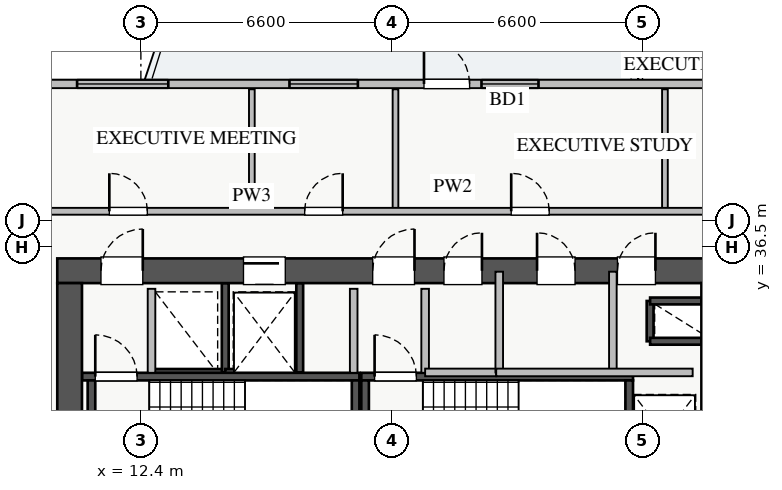
"""IFC4 building model, lengths in metres.
Left out: names, types, materials, properties, quantities, classifications, styles, units other than length and angle.
Written with IfcOpenShell. Run it as: python <this file> out.ifc"""

import sys

from ifc_helpers import new_model, si_unit, direction, frame, frame_2d, origin, place, context, subcontext, project, spatial, rectangle, extrude, source, transform, mapped, element, fill, save


model = new_model("IFC4")
c1 = context("Model", 3, precision=1e-05, world=origin(), true_north=direction((0.0, 1.0)))
c2 = subcontext(c1, "Body", "Model", "MODEL_VIEW")
j1 = project(units=[si_unit("LENGTHUNIT", "METRE"), si_unit("PLANEANGLEUNIT", "RADIAN")], contexts=[c1])
p1 = place(None, origin())
s1 = spatial("IfcSite", under=j1, at=p1, CompositionType="ELEMENT")
p2 = place(p1, origin())
s2 = spatial("IfcBuilding", under=s1, at=p2, CompositionType="ELEMENT")
p3 = place(p2, frame((0.0, 0.0, 97.0)))
s3 = spatial("IfcBuildingStorey", under=s2, at=p3, CompositionType="ELEMENT", Elevation=97.0)
p4 = place(p3, frame((12.68, 33.2, 0.0), z_axis=(0.0, 0.0, 1.0), x_axis=(1.0, 0.0, 0.0)))
e1 = element("IfcWall", 1, at=p4, inside=s3, PredefinedType="SHEAR", context=c2, shape_type="SweptSolid", body=[
    extrude(rectangle(XDim=1.94, YDim=0.18, at=frame_2d((0.97, 0.0))), origin(), (0.0, 0.0, 1.0), 3.07),
])
p5 = place(p3, frame((14.62, 33.2, 0.0), z_axis=(0.0, 0.0, 1.0), x_axis=(0.0, 1.0, 0.0)))
e2 = element("IfcWall", 2, at=p5, inside=s3, PredefinedType="SHEAR", context=c2, shape_type="SweptSolid", body=[
    extrude(rectangle(XDim=2.35, YDim=0.18, at=frame_2d((1.175, 0.0))), origin(), (0.0, 0.0, 1.0), 3.07),
])
p6 = place(p3, frame((25.8, 34.02, 0.0), z_axis=(0.0, 0.0, 1.0), x_axis=(0.0, 1.0, 0.0)))
e3 = element("IfcWall", 3, at=p6, inside=s3, PredefinedType="SHEAR", context=c2, shape_type="SweptSolid", body=[
    extrude(rectangle(XDim=1.06, YDim=0.18, at=frame_2d((0.53, 0.0))), origin(), (0.0, 0.0, 1.0), 3.07),
])
for number, where, z_axis, x_axis in (
    (4, (25.8, 35.08, 0.0), (0.0, 0.0, 1.0), (1.0, 0.0, 0.0)),
    (5, (25.8, 34.02, 0.0), (0.0, 0.0, 1.0), (1.0, 0.0, 0.0)),
):
    element("IfcWall", number, at=place(p3, frame(where, z_axis=z_axis, x_axis=x_axis)), inside=s3, PredefinedType="SHEAR", context=c2, shape_type="SweptSolid", body=[
        extrude(rectangle(XDim=1.35, YDim=0.18, at=frame_2d((0.675, 0.0))), origin(), (0.0, 0.0, 1.0), 3.07),
    ])
p7 = place(p3, frame((14.62, 33.2, 0.0), z_axis=(0.0, 0.0, 1.0), x_axis=(1.0, 0.0, 0.0)))
e6 = element("IfcWall", 6, at=p7, inside=s3, PredefinedType="SHEAR", context=c2, shape_type="SweptSolid", body=[
    extrude(rectangle(XDim=1.96, YDim=0.18, at=frame_2d((0.98, 0.0))), origin(), (0.0, 0.0, 1.0), 3.07),
])
p8 = place(p3, frame((16.58, 33.2, 0.0), z_axis=(0.0, 0.0, 1.0), x_axis=(0.0, 1.0, 0.0)))
e7 = element("IfcWall", 7, at=p8, inside=s3, PredefinedType="SHEAR", context=c2, shape_type="SweptSolid", body=[
    extrude(rectangle(XDim=2.35, YDim=0.18, at=frame_2d((1.175, 0.0))), origin(), (0.0, 0.0, 1.0), 3.07),
])
p9 = place(p3, frame((10.85, 33.09, 0.0), z_axis=(0.0, 0.0, 1.0), x_axis=(1.0, 0.0, 0.0)))
e8 = element("IfcWall", 8, at=p9, inside=s3, PredefinedType="SHEAR", context=c2, shape_type="SweptSolid", body=[
    extrude(rectangle(XDim=7.3, YDim=0.2, at=frame_2d((3.65, 0.0))), origin(), (0.0, 0.0, 1.0), 3.25),
])
p10 = place(p9, frame((0.35, 0.0, 0.0)))
e9 = element("IfcOpeningElement", 9, at=p10, cuts=e8, PredefinedType="OPENING", context=c2, shape_type="SweptSolid", body=[
    extrude(rectangle(XDim=1.1, YDim=2.05, at=frame_2d((0.55, 1.025))), frame((0.0, 0.11, 0.0), z_axis=(0.0, -1.0, 0.0), x_axis=(1.0, 0.0, 0.0)), (0.0, 0.0, 1.0), 0.22),
])
for number, where, z_axis, x_axis in (
    (10, (11.1, 30.05, 0.0), (0.0, 0.0, 1.0), (0.0, 1.0, 0.0)),
    (11, (18.05, 30.05, 0.0), (0.0, 0.0, 1.0), (0.0, 1.0, 0.0)),
):
    element("IfcWall", number, at=place(p3, frame(where, z_axis=z_axis, x_axis=x_axis)), inside=s3, PredefinedType="SHEAR", context=c2, shape_type="SweptSolid", body=[
        extrude(rectangle(XDim=2.94, YDim=0.2, at=frame_2d((1.47, 0.0))), origin(), (0.0, 0.0, 1.0), 3.25),
    ])
p11 = place(p3, frame((18.2, 33.09, 0.0), z_axis=(0.0, 0.0, 1.0), x_axis=(1.0, 0.0, 0.0)))
e12 = element("IfcWall", 12, at=p11, inside=s3, PredefinedType="SHEAR", context=c2, shape_type="SweptSolid", body=[
    extrude(rectangle(XDim=7.15, YDim=0.2, at=frame_2d((3.575, 0.0))), origin(), (0.0, 0.0, 1.0), 3.25),
])
p12 = place(p11, frame((0.35, 0.0, 0.0)))
e13 = element("IfcOpeningElement", 13, at=p12, cuts=e12, PredefinedType="OPENING", context=c2, shape_type="SweptSolid", body=[
    extrude(rectangle(XDim=1.1, YDim=2.05, at=frame_2d((0.55, 1.025))), frame((0.0, 0.11, 0.0), z_axis=(0.0, -1.0, 0.0), x_axis=(1.0, 0.0, 0.0)), (0.0, 0.0, 1.0), 0.22),
])
for number, where, z_axis, x_axis in (
    (14, (18.3, 30.05, 0.0), (0.0, 0.0, 1.0), (0.0, 1.0, 0.0)),
    (15, (25.25, 30.05, 0.0), (0.0, 0.0, 1.0), (0.0, 1.0, 0.0)),
):
    element("IfcWall", number, at=place(p3, frame(where, z_axis=z_axis, x_axis=x_axis)), inside=s3, PredefinedType="SHEAR", context=c2, shape_type="SweptSolid", body=[
        extrude(rectangle(XDim=2.94, YDim=0.2, at=frame_2d((1.47, 0.0))), origin(), (0.0, 0.0, 1.0), 3.25),
    ])
p13 = place(p3, frame((10.2, 35.875, 0.0), z_axis=(0.0, 0.0, 1.0), x_axis=(1.0, 0.0, 0.0)))
e16 = element("IfcWall", 16, at=p13, inside=s3, PredefinedType="SHEAR", context=c2, shape_type="SweptSolid", body=[
    extrude(rectangle(XDim=17.6, YDim=0.65, at=frame_2d((8.8, 0.0))), origin(), (0.0, 0.0, 1.0), 3.25),
])
p14 = place(p13, frame((1.15, 0.0, 0.0)))
e17 = element("IfcOpeningElement", 17, at=p14, cuts=e16, PredefinedType="OPENING", context=c2, shape_type="SweptSolid", body=[
    extrude(rectangle(XDim=1.1, YDim=2.05, at=frame_2d((0.55, 1.025))), frame((0.0, 0.335, 0.0), z_axis=(0.0, -1.0, 0.0), x_axis=(1.0, 0.0, 0.0)), (0.0, 0.0, 1.0), 0.67),
])
p15 = place(p13, frame((8.3, 0.0, 0.0)))
e18 = element("IfcOpeningElement", 18, at=p15, cuts=e16, PredefinedType="OPENING", context=c2, shape_type="SweptSolid", body=[
    extrude(rectangle(XDim=1.1, YDim=2.05, at=frame_2d((0.55, 1.025))), frame((0.0, 0.335, 0.0), z_axis=(0.0, -1.0, 0.0), x_axis=(1.0, 0.0, 0.0)), (0.0, 0.0, 1.0), 0.67),
])
p16 = place(p13, frame((4.9, 0.0, 0.0)))
e19 = element("IfcOpeningElement", 19, at=p16, cuts=e16, PredefinedType="OPENING", context=c2, shape_type="SweptSolid", body=[
    extrude(rectangle(XDim=1.1, YDim=2.05, at=frame_2d((0.55, 1.025))), frame((0.0, 0.335, 0.0), z_axis=(0.0, -1.0, 0.0), x_axis=(1.0, 0.0, 0.0)), (0.0, 0.0, 1.0), 0.67),
])
p17 = place(p13, frame((14.74, 0.0, 0.0)))
e20 = element("IfcOpeningElement", 20, at=p17, cuts=e16, PredefinedType="OPENING", context=c2, shape_type="SweptSolid", body=[
    extrude(rectangle(XDim=1.0, YDim=2.05, at=frame_2d((0.5, 1.025))), frame((0.0, 0.335, 0.0), z_axis=(0.0, -1.0, 0.0), x_axis=(1.0, 0.0, 0.0)), (0.0, 0.0, 1.0), 0.67),
])
p18 = place(p13, frame((10.175, 0.0, 0.0)))
e21 = element("IfcOpeningElement", 21, at=p18, cuts=e16, PredefinedType="OPENING", context=c2, shape_type="SweptSolid", body=[
    extrude(rectangle(XDim=1.0, YDim=2.05, at=frame_2d((0.5, 1.025))), frame((0.0, 0.335, 0.0), z_axis=(0.0, -1.0, 0.0), x_axis=(1.0, 0.0, 0.0)), (0.0, 0.0, 1.0), 0.67),
])
p19 = place(p13, frame((12.625, 0.0, 0.0)))
e22 = element("IfcOpeningElement", 22, at=p19, cuts=e16, PredefinedType="OPENING", context=c2, shape_type="SweptSolid", body=[
    extrude(rectangle(XDim=1.0, YDim=2.05, at=frame_2d((0.5, 1.025))), frame((0.0, 0.335, 0.0), z_axis=(0.0, -1.0, 0.0), x_axis=(1.0, 0.0, 0.0)), (0.0, 0.0, 1.0), 0.67),
])
p20 = place(p3, frame((10.525, 29.65, 0.0), z_axis=(0.0, 0.0, 1.0), x_axis=(0.0, 1.0, 0.0)))
e23 = element("IfcWall", 23, at=p20, inside=s3, PredefinedType="SHEAR", context=c2, shape_type="SweptSolid", body=[
    extrude(rectangle(XDim=5.9, YDim=0.65, at=frame_2d((2.95, 0.0))), origin(), (0.0, 0.0, 1.0), 3.25),
])
p21 = place(p3, frame((27.475, 29.65, 0.0), z_axis=(0.0, 0.0, 1.0), x_axis=(0.0, 1.0, 0.0)))
e24 = element("IfcWall", 24, at=p21, inside=s3, PredefinedType="SHEAR", context=c2, shape_type="SweptSolid", body=[
    extrude(rectangle(XDim=5.9, YDim=0.65, at=frame_2d((2.95, 0.0))), origin(), (0.0, 0.0, 1.0), 3.25),
])
p22 = place(p21, frame((1.1, 0.0, 0.0)))
e25 = element("IfcOpeningElement", 25, at=p22, cuts=e24, PredefinedType="OPENING", context=c2, shape_type="SweptSolid", body=[
    extrude(rectangle(XDim=1.3, YDim=2.05, at=frame_2d((0.65, 1.025))), frame((0.0, 0.335, 0.0), z_axis=(0.0, -1.0, 0.0), x_axis=(1.0, 0.0, 0.0)), (0.0, 0.0, 1.0), 0.67),
])
p23 = place(p3, frame((6.55, 40.79, 0.0), z_axis=(0.0, 0.0, 1.0), x_axis=(1.0, 0.0, 0.0)))
e26 = element("IfcWall", 26, at=p23, inside=s3, PredefinedType="STANDARD", context=c2, shape_type="SweptSolid", body=[
    extrude(rectangle(XDim=24.9, YDim=0.22, at=frame_2d((12.45, 0.0))), origin(), (0.0, 0.0, 1.0), 2.61),
])
p24 = place(p23, frame((13.3, 0.0, 0.0)))
e27 = element("IfcOpeningElement", 27, at=p24, cuts=e26, PredefinedType="OPENING", context=c2, shape_type="SweptSolid", body=[
    extrude(rectangle(XDim=1.2, YDim=2.1, at=frame_2d((0.6, 1.05))), frame((0.0, 0.12, 0.0), z_axis=(0.0, -1.0, 0.0), x_axis=(1.0, 0.0, 0.0)), (0.0, 0.0, 1.0), 0.24),
])
p25 = place(p23, frame((0.393, 0.0, 0.9)))
e28 = element("IfcOpeningElement", 28, at=p25, cuts=e26, PredefinedType="OPENING", context=c2, shape_type="SweptSolid", body=[
    extrude(rectangle(XDim=1.5, YDim=1.5, at=frame_2d((0.75, 0.75))), frame((0.0, 0.12, 0.0), z_axis=(0.0, -1.0, 0.0), x_axis=(1.0, 0.0, 0.0)), (0.0, 0.0, 1.0), 0.24),
])
p26 = place(p23, frame((9.76, 0.0, 0.9)))
e29 = element("IfcOpeningElement", 29, at=p26, cuts=e26, PredefinedType="OPENING", context=c2, shape_type="SweptSolid", body=[
    extrude(rectangle(XDim=1.8, YDim=1.5, at=frame_2d((0.9, 0.75))), frame((0.0, 0.12, 0.0), z_axis=(0.0, -1.0, 0.0), x_axis=(1.0, 0.0, 0.0)), (0.0, 0.0, 1.0), 0.24),
])
p27 = place(p23, frame((14.813, 0.0, 0.9)))
e30 = element("IfcOpeningElement", 30, at=p27, cuts=e26, PredefinedType="OPENING", context=c2, shape_type="SweptSolid", body=[
    extrude(rectangle(XDim=1.5, YDim=1.45, at=frame_2d((0.75, 0.725))), frame((0.0, 0.12, 0.0), z_axis=(0.0, -1.0, 0.0), x_axis=(1.0, 0.0, 0.0)), (0.0, 0.0, 1.0), 0.24),
])
p28 = place(p23, frame((20.738, 0.0, 0.9)))
e31 = element("IfcOpeningElement", 31, at=p28, cuts=e26, PredefinedType="OPENING", context=c2, shape_type="SweptSolid", body=[
    extrude(rectangle(XDim=2.1, YDim=1.48, at=frame_2d((1.05, 0.74))), frame((0.0, 0.12, 0.0), z_axis=(0.0, -1.0, 0.0), x_axis=(1.0, 0.0, 0.0)), (0.0, 0.0, 1.0), 0.24),
])
p29 = place(p23, frame((4.171, 0.0, 0.9)))
e32 = element("IfcOpeningElement", 32, at=p29, cuts=e26, PredefinedType="OPENING", context=c2, shape_type="SweptSolid", body=[
    extrude(rectangle(XDim=2.4, YDim=1.5, at=frame_2d((1.2, 0.75))), frame((0.0, 0.12, 0.0), z_axis=(0.0, -1.0, 0.0), x_axis=(1.0, 0.0, 0.0)), (0.0, 0.0, 1.0), 0.24),
])
for number, where, z_axis, x_axis in (
    (33, (12.68, 33.19, 0.0), (0.0, 0.0, 1.0), (0.0, 1.0, 0.0)),
    (34, (18.0, 33.19, 0.0), (0.0, 0.0, 1.0), (0.0, 1.0, 0.0)),
    (35, (19.88, 33.19, 0.0), (0.0, 0.0, 1.0), (0.0, 1.0, 0.0)),
):
    element("IfcWall", number, at=place(p3, frame(where, z_axis=z_axis, x_axis=x_axis)), inside=s3, PredefinedType="PARTITIONING", context=c2, shape_type="SweptSolid", body=[
        extrude(rectangle(XDim=2.21, YDim=0.2, at=frame_2d((1.105, 0.0))), origin(), (0.0, 0.0, 1.0), 3.07),
    ])
p30 = place(p3, frame((24.82, 33.2, 0.0), z_axis=(0.0, 0.0, 1.0), x_axis=(0.0, 1.0, 0.0)))
e36 = element("IfcWall", 36, at=p30, inside=s3, PredefinedType="PARTITIONING", context=c2, shape_type="SweptSolid", body=[
    extrude(rectangle(XDim=2.65, YDim=0.2, at=frame_2d((1.325, 0.0))), origin(), (0.0, 0.0, 1.0), 3.07),
])
p31 = place(p3, frame((19.88, 33.2, 0.0), z_axis=(0.0, 0.0, 1.0), x_axis=(1.0, 0.0, 0.0)))
e37 = element("IfcWall", 37, at=p31, inside=s3, PredefinedType="PARTITIONING", context=c2, shape_type="SweptSolid", body=[
    extrude(rectangle(XDim=1.87, YDim=0.2, at=frame_2d((0.935, 0.0))), origin(), (0.0, 0.0, 1.0), 3.07),
])
p32 = place(p3, frame((21.83, 33.2, 0.0), z_axis=(0.0, 0.0, 1.0), x_axis=(0.0, 1.0, 0.0)))
e38 = element("IfcWall", 38, at=p32, inside=s3, PredefinedType="PARTITIONING", context=c2, shape_type="SweptSolid", body=[
    extrude(rectangle(XDim=2.65, YDim=0.2, at=frame_2d((1.325, 0.0))), origin(), (0.0, 0.0, 1.0), 3.07),
])
p33 = place(p3, frame((21.75, 33.2, 0.0), z_axis=(0.0, 0.0, 1.0), x_axis=(1.0, 0.0, 0.0)))
e39 = element("IfcWall", 39, at=p33, inside=s3, PredefinedType="PARTITIONING", context=c2, shape_type="SweptSolid", body=[
    extrude(rectangle(XDim=5.17, YDim=0.2, at=frame_2d((2.585, 0.0))), origin(), (0.0, 0.0, 1.0), 3.07),
])
p34 = place(p3, frame((15.32, 37.44, 0.0), z_axis=(0.0, 0.0, 1.0), x_axis=(0.0, 1.0, 0.0)))
e40 = element("IfcWall", 40, at=p34, inside=s3, PredefinedType="PARTITIONING", context=c2, shape_type="SweptSolid", body=[
    extrude(rectangle(XDim=3.21, YDim=0.15, at=frame_2d((1.605, 0.0))), origin(), (0.0, 0.0, 1.0), 3.07),
])
p35 = place(p3, frame((19.1, 37.44, 0.0), z_axis=(0.0, 0.0, 1.0), x_axis=(0.0, 1.0, 0.0)))
e41 = element("IfcWall", 41, at=p35, inside=s3, PredefinedType="PARTITIONING", context=c2, shape_type="SweptSolid", body=[
    extrude(rectangle(XDim=3.21, YDim=0.15, at=frame_2d((1.605, 0.0))), origin(), (0.0, 0.0, 1.0), 2.815),
])
p36 = place(p3, frame((26.19, 37.44, 0.0), z_axis=(0.0, 0.0, 1.0), x_axis=(0.0, 1.0, 0.0)))
e42 = element("IfcWall", 42, at=p36, inside=s3, PredefinedType="PARTITIONING", context=c2, shape_type="SweptSolid", body=[
    extrude(rectangle(XDim=3.21, YDim=0.15, at=frame_2d((1.605, 0.0))), origin(), (0.0, 0.0, 1.0), 3.07),
])
p37 = place(p3, frame((8.82, 37.44, 0.0), z_axis=(0.0, 0.0, 1.0), x_axis=(1.0, 0.0, 0.0)))
e43 = element("IfcWall", 43, at=p37, inside=s3, PredefinedType="PARTITIONING", context=c2, shape_type="SweptSolid", body=[
    extrude(rectangle(XDim=23.58, YDim=0.18, at=frame_2d((11.79, 0.0))), origin(), (0.0, 0.0, 1.0), 3.07),
])
p38 = place(p37, frame((2.75, 0.0, 0.0)))
e44 = element("IfcOpeningElement", 44, at=p38, cuts=e43, PredefinedType="OPENING", context=c2, shape_type="SweptSolid", body=[
    extrude(rectangle(XDim=1.0, YDim=2.05, at=frame_2d((0.5, 1.025))), frame((0.0, 0.1, 0.0), z_axis=(0.0, -1.0, 0.0), x_axis=(1.0, 0.0, 0.0)), (0.0, 0.0, 1.0), 0.2),
])
p39 = place(p37, frame((7.89, 0.0, 0.0)))
e45 = element("IfcOpeningElement", 45, at=p39, cuts=e43, PredefinedType="OPENING", context=c2, shape_type="SweptSolid", body=[
    extrude(rectangle(XDim=1.0, YDim=2.05, at=frame_2d((0.5, 1.025))), frame((0.0, 0.1, 0.0), z_axis=(0.0, -1.0, 0.0), x_axis=(1.0, 0.0, 0.0)), (0.0, 0.0, 1.0), 0.2),
])
p40 = place(p37, frame((13.325, 0.0, 0.0)))
e46 = element("IfcOpeningElement", 46, at=p40, cuts=e43, PredefinedType="OPENING", context=c2, shape_type="SweptSolid", body=[
    extrude(rectangle(XDim=1.0, YDim=2.05, at=frame_2d((0.5, 1.025))), frame((0.0, 0.1, 0.0), z_axis=(0.0, -1.0, 0.0), x_axis=(1.0, 0.0, 0.0)), (0.0, 0.0, 1.0), 0.2),
])
p41 = place(p37, frame((19.765, 0.0, 0.0)))
e47 = element("IfcOpeningElement", 47, at=p41, cuts=e43, PredefinedType="OPENING", context=c2, shape_type="SweptSolid", body=[
    extrude(rectangle(XDim=1.0, YDim=2.05, at=frame_2d((0.5, 1.025))), frame((0.0, 0.1, 0.0), z_axis=(0.0, -1.0, 0.0), x_axis=(1.0, 0.0, 0.0)), (0.0, 0.0, 1.0), 0.2),
])
m1 = source(origin(), c2, "Body", "SweptSolid", [
    extrude(rectangle(XDim=1.2, YDim=2.1, at=frame_2d((0.6, 1.05))), frame((0.0, 0.025, 0.0), z_axis=(0.0, -1.0, 0.0), x_axis=(1.0, 0.0, 0.0)), (0.0, 0.0, 1.0), 0.05),
])
p42 = place(p24, origin())
e48 = element("IfcDoor", 48, at=p42, inside=s3, OperationType="SINGLE_SWING_LEFT", PredefinedType="DOOR", context=c2, shape_type="MappedRepresentation", body=[
    mapped(m1, transform((0.0, 0.0, 0.0), x_axis=(1.0, 0.0, 0.0), y_axis=(0.0, 1.0, 0.0), z_axis=(0.0, 0.0, 1.0), scale=1.0)),
])
fill(e27, e48)
m2 = source(origin(), c2, "Body", "SweptSolid", [
    extrude(rectangle(XDim=1.8, YDim=1.5, at=frame_2d((0.9, 0.75))), frame((0.0, 0.03, 0.0), z_axis=(0.0, -1.0, 0.0), x_axis=(1.0, 0.0, 0.0)), (0.0, 0.0, 1.0), 0.06),
])
p43 = place(p26, origin())
e49 = element("IfcWindow", 49, at=p43, inside=s3, PartitioningType="DOUBLE_PANEL_VERTICAL", PredefinedType="WINDOW", context=c2, shape_type="MappedRepresentation", body=[
    mapped(m2, transform((0.0, 0.0, 0.0), x_axis=(1.0, 0.0, 0.0), y_axis=(0.0, 1.0, 0.0), z_axis=(0.0, 0.0, 1.0), scale=1.0)),
])
fill(e29, e49)
m3 = source(origin(), c2, "Body", "SweptSolid", [
    extrude(rectangle(XDim=1.5, YDim=1.45, at=frame_2d((0.75, 0.725))), frame((0.0, 0.03, 0.0), z_axis=(0.0, -1.0, 0.0), x_axis=(1.0, 0.0, 0.0)), (0.0, 0.0, 1.0), 0.06),
])
p44 = place(p27, origin())
e50 = element("IfcWindow", 50, at=p44, inside=s3, PartitioningType="DOUBLE_PANEL_VERTICAL", PredefinedType="WINDOW", context=c2, shape_type="MappedRepresentation", body=[
    mapped(m3, transform((0.0, 0.0, 0.0), x_axis=(1.0, 0.0, 0.0), y_axis=(0.0, 1.0, 0.0), z_axis=(0.0, 0.0, 1.0), scale=1.0)),
])
fill(e30, e50)
m4 = source(origin(), c2, "Body", "SweptSolid", [
    extrude(rectangle(XDim=1.1, YDim=2.05, at=frame_2d((0.55, 1.025))), frame((0.0, 0.025, 0.0), z_axis=(0.0, -1.0, 0.0), x_axis=(1.0, 0.0, 0.0)), (0.0, 0.0, 1.0), 0.05),
])
p45 = place(p14, origin())
e51 = element("IfcDoor", 51, at=p45, inside=s3, OperationType="SINGLE_SWING_RIGHT", PredefinedType="DOOR", context=c2, shape_type="MappedRepresentation", body=[
    mapped(m4, transform((0.0, 0.0, 0.0), x_axis=(1.0, 0.0, 0.0), y_axis=(0.0, 1.0, 0.0), z_axis=(0.0, 0.0, 1.0), scale=1.0)),
])
fill(e17, e51)
p46 = place(p10, origin())
e52 = element("IfcDoor", 52, at=p46, inside=s3, OperationType="SINGLE_SWING_LEFT", PredefinedType="DOOR", context=c2, shape_type="MappedRepresentation", body=[
    mapped(m4, transform((0.0, 0.0, 0.0), x_axis=(1.0, 0.0, 0.0), y_axis=(0.0, 1.0, 0.0), z_axis=(0.0, 0.0, 1.0), scale=1.0)),
])
fill(e9, e52)
p47 = place(p15, origin())
e53 = element("IfcDoor", 53, at=p47, inside=s3, OperationType="SINGLE_SWING_RIGHT", PredefinedType="DOOR", context=c2, shape_type="MappedRepresentation", body=[
    mapped(m4, transform((0.0, 0.0, 0.0), x_axis=(1.0, 0.0, 0.0), y_axis=(0.0, 1.0, 0.0), z_axis=(0.0, 0.0, 1.0), scale=1.0)),
])
fill(e18, e53)
p48 = place(p12, origin())
e54 = element("IfcDoor", 54, at=p48, inside=s3, OperationType="SINGLE_SWING_LEFT", PredefinedType="DOOR", context=c2, shape_type="MappedRepresentation", body=[
    mapped(m4, transform((0.0, 0.0, 0.0), x_axis=(1.0, 0.0, 0.0), y_axis=(0.0, 1.0, 0.0), z_axis=(0.0, 0.0, 1.0), scale=1.0)),
])
fill(e13, e54)
p49 = place(p16, origin())
e55 = element("IfcDoor", 55, at=p49, inside=s3, OperationType="SLIDING_TO_LEFT", PredefinedType="DOOR", context=c2, shape_type="MappedRepresentation", body=[
    mapped(m4, transform((0.0, 0.0, 0.0), x_axis=(1.0, 0.0, 0.0), y_axis=(0.0, 1.0, 0.0), z_axis=(0.0, 0.0, 1.0), scale=1.0)),
])
fill(e19, e55)
m5 = source(origin(), c2, "Body", "SweptSolid", [
    extrude(rectangle(XDim=1.0, YDim=2.05, at=frame_2d((0.5, 1.025))), frame((0.0, 0.025, 0.0), z_axis=(0.0, -1.0, 0.0), x_axis=(1.0, 0.0, 0.0)), (0.0, 0.0, 1.0), 0.05),
])
p50 = place(p17, origin())
e56 = element("IfcDoor", 56, at=p50, inside=s3, OperationType="SINGLE_SWING_RIGHT", PredefinedType="DOOR", context=c2, shape_type="MappedRepresentation", body=[
    mapped(m5, transform((0.0, 0.0, 0.0), x_axis=(1.0, 0.0, 0.0), y_axis=(0.0, 1.0, 0.0), z_axis=(0.0, 0.0, 1.0), scale=1.0)),
])
fill(e20, e56)
p51 = place(p18, origin())
e57 = element("IfcDoor", 57, at=p51, inside=s3, OperationType="SINGLE_SWING_RIGHT", PredefinedType="DOOR", context=c2, shape_type="MappedRepresentation", body=[
    mapped(m5, transform((0.0, 0.0, 0.0), x_axis=(1.0, 0.0, 0.0), y_axis=(0.0, 1.0, 0.0), z_axis=(0.0, 0.0, 1.0), scale=1.0)),
])
fill(e21, e57)
p52 = place(p19, origin())
e58 = element("IfcDoor", 58, at=p52, inside=s3, OperationType="SINGLE_SWING_LEFT", PredefinedType="DOOR", context=c2, shape_type="MappedRepresentation", body=[
    mapped(m5, transform((0.0, 0.0, 0.0), x_axis=(1.0, 0.0, 0.0), y_axis=(0.0, 1.0, 0.0), z_axis=(0.0, 0.0, 1.0), scale=1.0)),
])
fill(e22, e58)
p53 = place(p38, origin())
e59 = element("IfcDoor", 59, at=p53, inside=s3, OperationType="SINGLE_SWING_LEFT", PredefinedType="DOOR", context=c2, shape_type="MappedRepresentation", body=[
    mapped(m5, transform((0.0, 0.0, 0.0), x_axis=(1.0, 0.0, 0.0), y_axis=(0.0, 1.0, 0.0), z_axis=(0.0, 0.0, 1.0), scale=1.0)),
])
fill(e44, e59)
p54 = place(p39, origin())
e60 = element("IfcDoor", 60, at=p54, inside=s3, OperationType="SINGLE_SWING_RIGHT", PredefinedType="DOOR", context=c2, shape_type="MappedRepresentation", body=[
    mapped(m5, transform((0.0, 0.0, 0.0), x_axis=(1.0, 0.0, 0.0), y_axis=(0.0, 1.0, 0.0), z_axis=(0.0, 0.0, 1.0), scale=1.0)),
])
fill(e45, e60)
p55 = place(p40, origin())
e61 = element("IfcDoor", 61, at=p55, inside=s3, OperationType="SINGLE_SWING_LEFT", PredefinedType="DOOR", context=c2, shape_type="MappedRepresentation", body=[
    mapped(m5, transform((0.0, 0.0, 0.0), x_axis=(1.0, 0.0, 0.0), y_axis=(0.0, 1.0, 0.0), z_axis=(0.0, 0.0, 1.0), scale=1.0)),
])
fill(e46, e61)
m6 = source(origin(), c2, "Body", "SweptSolid", [
    extrude(rectangle(XDim=2.4, YDim=1.5, at=frame_2d((1.2, 0.75))), frame((0.0, 0.03, 0.0), z_axis=(0.0, -1.0, 0.0), x_axis=(1.0, 0.0, 0.0)), (0.0, 0.0, 1.0), 0.06),
])
p56 = place(p29, origin())
e62 = element("IfcWindow", 62, at=p56, inside=s3, PartitioningType="TRIPLE_PANEL_VERTICAL", PredefinedType="WINDOW", context=c2, shape_type="MappedRepresentation", body=[
    mapped(m6, transform((0.0, 0.0, 0.0), x_axis=(1.0, 0.0, 0.0), y_axis=(0.0, 1.0, 0.0), z_axis=(0.0, 0.0, 1.0), scale=1.0)),
])
fill(e32, e62)
save(model, sys.argv[1])
